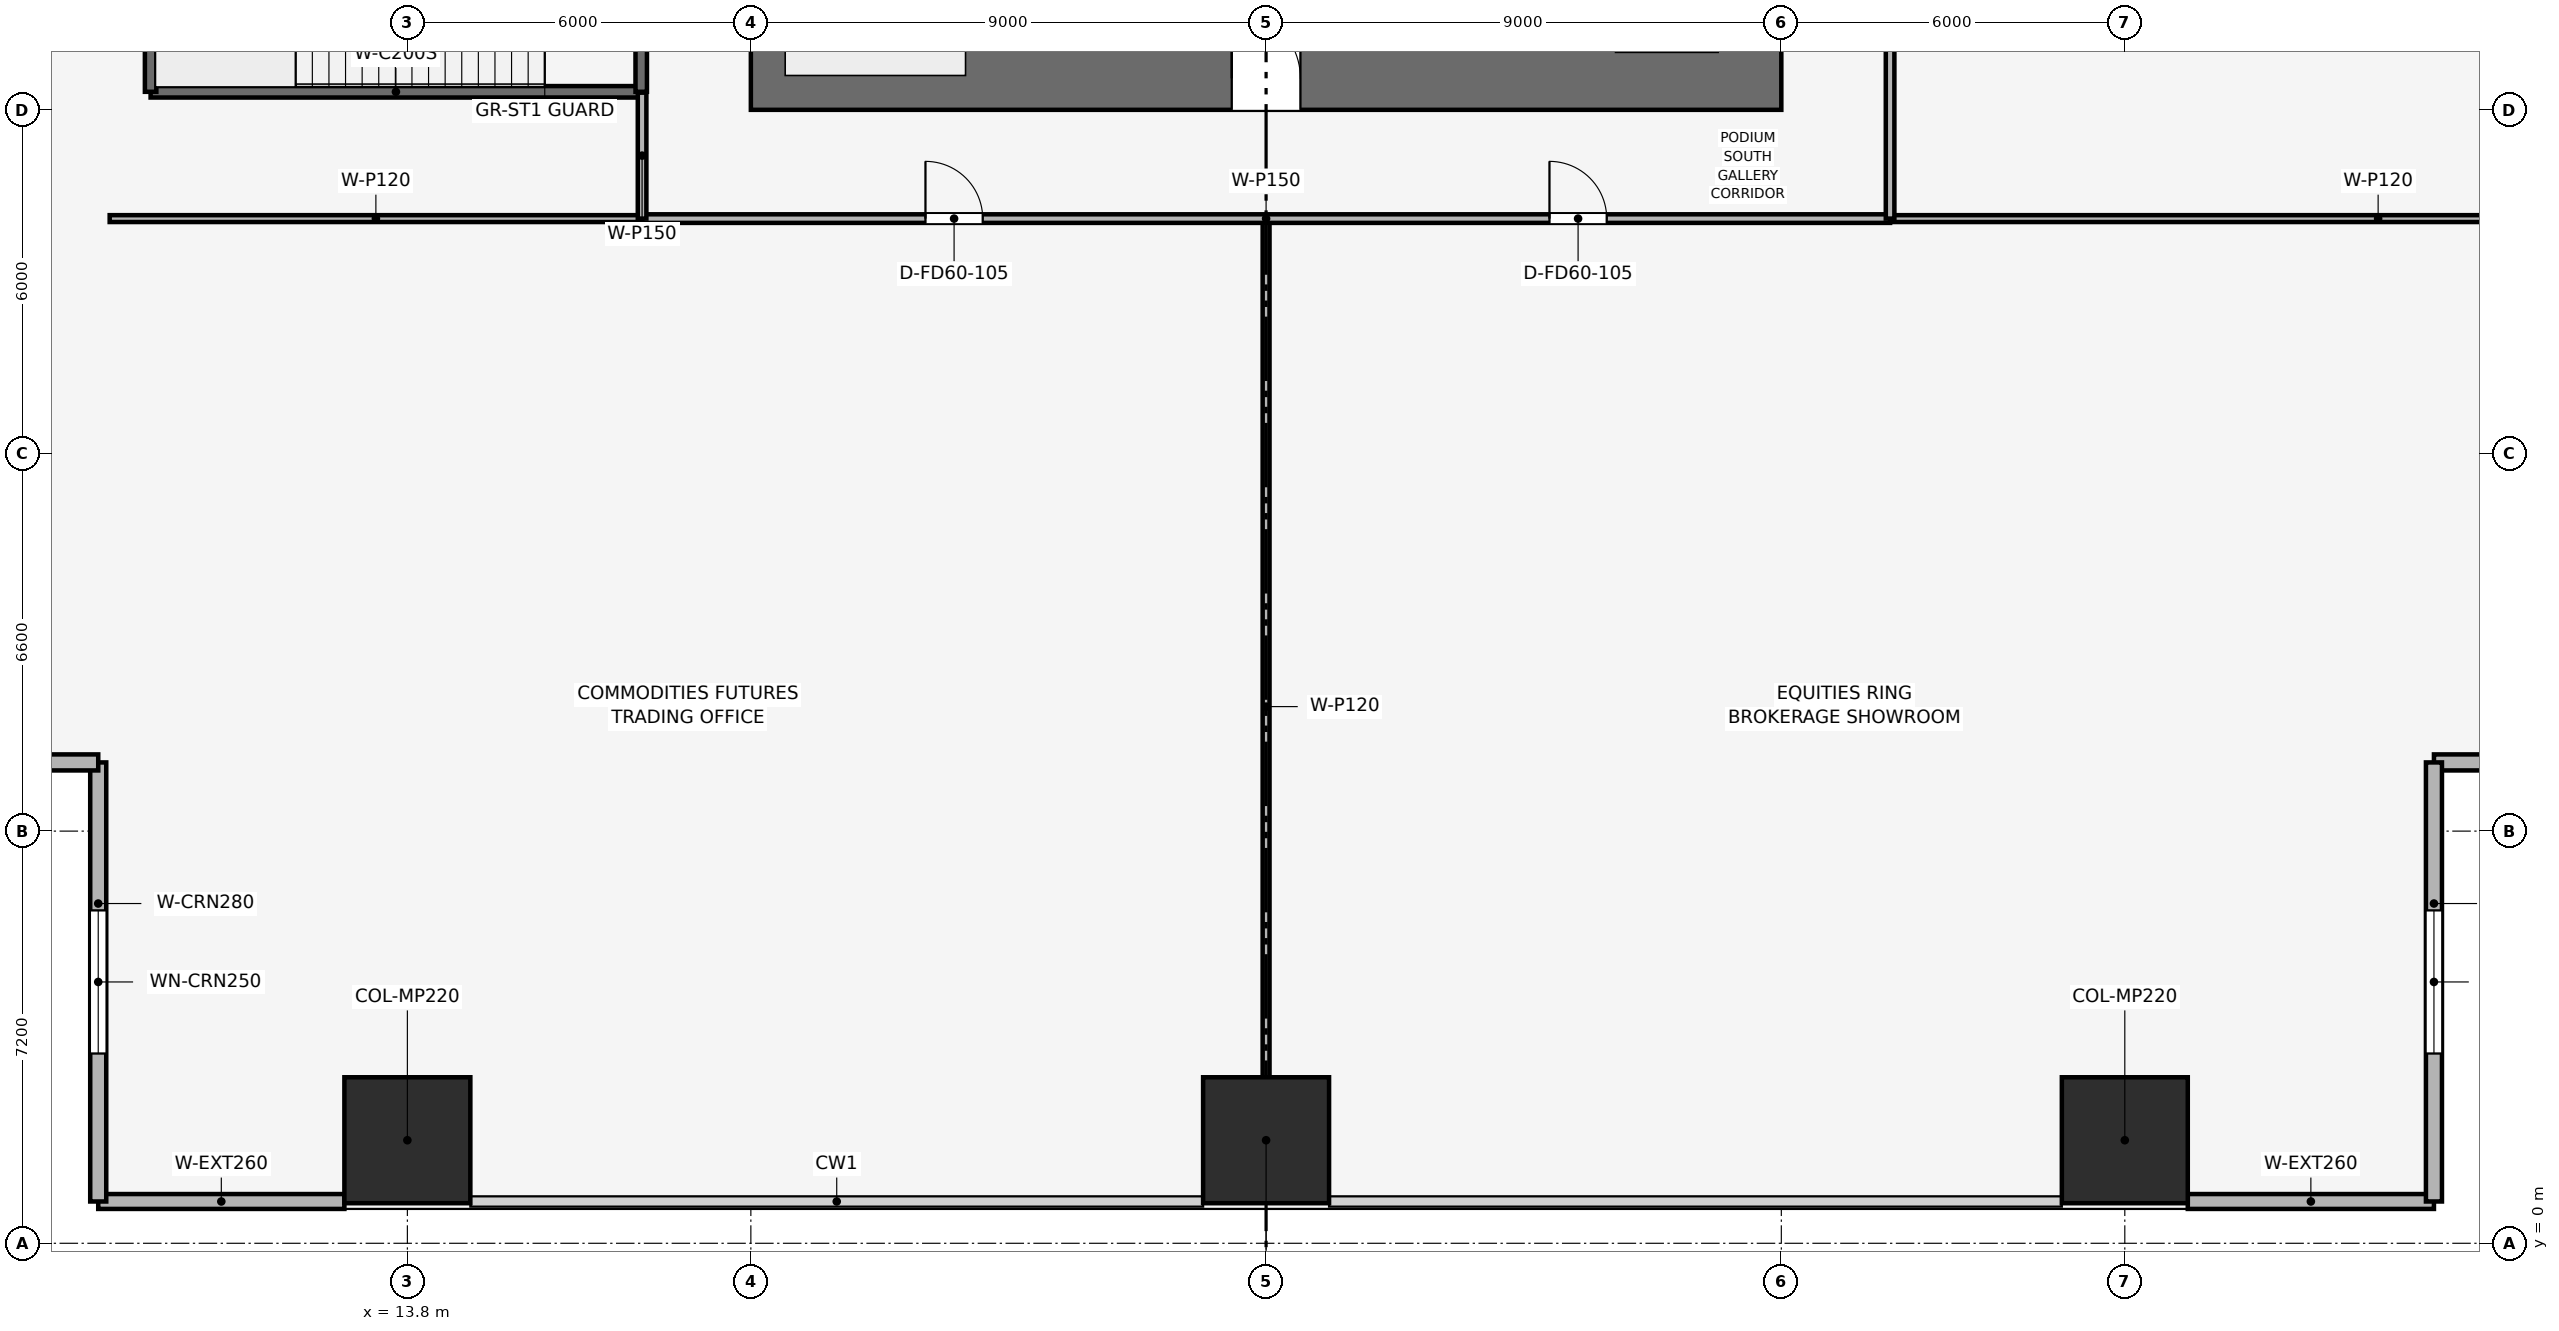
"""IFC4 building model, lengths in metres.
Left out: names, types, materials, properties, quantities, classifications, styles, units other than length and angle.
Written with IfcOpenShell. Run it as: python <this file> out.ifc"""

import sys

from ifc_helpers import new_model, si_unit, direction, frame, frame_2d, origin, origin_2d, place, context, subcontext, project, spatial, rectangle, extrude, element, fill, save


model = new_model("IFC4")
c1 = context("Model", 3, precision=1e-05, world=origin(), true_north=direction((0.0, 1.0)))
c2 = subcontext(c1, "Body", "Model", "MODEL_VIEW")
j1 = project(units=[si_unit("LENGTHUNIT", "METRE"), si_unit("PLANEANGLEUNIT", "RADIAN")], contexts=[c1])
p1 = place(None, origin())
s1 = spatial("IfcSite", under=j1, at=p1, CompositionType="ELEMENT")
p2 = place(p1, origin())
s2 = spatial("IfcBuilding", under=s1, at=p2, CompositionType="ELEMENT")
p3 = place(p2, frame((0.0, 0.0, 8.4)))
s3 = spatial("IfcBuildingStorey", under=s2, at=p3, CompositionType="ELEMENT", Elevation=8.4)
p4 = place(p3, frame((19.8, 20.35, 0.0), z_axis=(0.0, 0.0, 1.0), x_axis=(1.0, 0.0, 0.0)))
e1 = element("IfcWall", 1, at=p4, inside=s3, PredefinedType="SHEAR", context=c2, shape_type="SweptSolid", body=[
    extrude(rectangle(XDim=18.0, YDim=1.1, at=frame_2d((9.0, 0.0))), origin(), (0.0, 0.0, 1.0), 5.4),
])
p5 = place(p4, frame((8.4, 0.0, 0.0)))
e2 = element("IfcOpeningElement", 2, at=p5, cuts=e1, PredefinedType="OPENING", context=c2, shape_type="SweptSolid", body=[
    extrude(rectangle(XDim=1.2, YDim=2.2, at=frame_2d((0.6, 1.1))), frame((0.0, 0.56, 0.0), z_axis=(0.0, -1.0, 0.0), x_axis=(1.0, 0.0, 0.0)), (0.0, 0.0, 1.0), 1.12),
])
for number, where, z_axis, x_axis in (
    (3, (13.8, 1.8, 0.002), (0.0, 0.0, 1.0), (1.0, 0.0, 0.0)),
    (4, (28.8, 1.8, 0.002), (0.0, 0.0, 1.0), (1.0, 0.0, 0.0)),
    (5, (43.8, 1.8, 0.002), (0.0, 0.0, 1.0), (1.0, 0.0, 0.0)),
):
    element("IfcColumn", number, at=place(p3, frame(where, z_axis=z_axis, x_axis=x_axis)), inside=s3, PredefinedType="PILASTER", context=c2, shape_type="SweptSolid", body=[
        extrude(rectangle(XDim=2.2, YDim=2.2, at=origin_2d()), origin(), (0.0, 0.0, 1.0), 5.396),
    ])
for number, where, z_axis, x_axis in (
    (6, (12.7, 0.73, 0.0), (0.0, 0.0, 1.0), (-1.0, 0.0, 0.0)),
    (7, (49.2, 0.73, 0.0), (0.0, 0.0, 1.0), (-1.0, 0.0, 0.0)),
):
    element("IfcWall", number, at=place(p3, frame(where, z_axis=z_axis, x_axis=x_axis)), inside=s3, PredefinedType="SOLIDWALL", context=c2, shape_type="SweptSolid", body=[
        extrude(rectangle(XDim=4.3, YDim=0.26, at=frame_2d((2.15, 0.0))), origin(), (0.0, 0.0, 1.0), 5.05),
    ])
p6 = place(p3, frame((8.4, 0.73, 0.0), z_axis=(0.0, 0.0, 1.0), x_axis=(0.0, 1.0, 0.0)))
e8 = element("IfcWall", 8, at=p6, inside=s3, PredefinedType="SOLIDWALL", context=c2, shape_type="SweptSolid", body=[
    extrude(rectangle(XDim=7.67, YDim=0.28, at=frame_2d((3.835, 0.0))), origin(), (0.0, 0.0, 1.0), 5.05),
])
p7 = place(p6, frame((2.585, 0.0, 0.9)))
e9 = element("IfcOpeningElement", 9, at=p7, cuts=e8, PredefinedType="OPENING", context=c2, shape_type="SweptSolid", body=[
    extrude(rectangle(XDim=2.5, YDim=1.9, at=frame_2d((1.25, 0.95))), frame((0.0, 0.15, 0.0), z_axis=(0.0, -1.0, 0.0), x_axis=(1.0, 0.0, 0.0)), (0.0, 0.0, 1.0), 0.3),
])
p8 = place(p3, frame((8.4, 8.4, 0.0), z_axis=(0.0, 0.0, 1.0), x_axis=(-1.0, 0.0, 0.0)))
e10 = element("IfcWall", 10, at=p8, inside=s3, PredefinedType="SOLIDWALL", context=c2, shape_type="SweptSolid", body=[
    extrude(rectangle(XDim=7.67, YDim=0.28, at=frame_2d((3.835, 0.0))), origin(), (0.0, 0.0, 1.0), 5.05),
])
p9 = place(p8, frame((2.585, 0.0, 0.9)))
e11 = element("IfcOpeningElement", 11, at=p9, cuts=e10, PredefinedType="OPENING", context=c2, shape_type="SweptSolid", body=[
    extrude(rectangle(XDim=2.5, YDim=1.9, at=frame_2d((1.25, 0.95))), frame((0.0, 0.15, 0.0), z_axis=(0.0, -1.0, 0.0), x_axis=(1.0, 0.0, 0.0)), (0.0, 0.0, 1.0), 0.3),
])
p10 = place(p3, frame((56.87, 8.4, 0.0), z_axis=(0.0, 0.0, 1.0), x_axis=(-1.0, 0.0, 0.0)))
e12 = element("IfcWall", 12, at=p10, inside=s3, PredefinedType="SOLIDWALL", context=c2, shape_type="SweptSolid", body=[
    extrude(rectangle(XDim=7.67, YDim=0.28, at=frame_2d((3.835, 0.0))), origin(), (0.0, 0.0, 1.0), 5.05),
])
p11 = place(p10, frame((2.585, 0.0, 0.9)))
e13 = element("IfcOpeningElement", 13, at=p11, cuts=e12, PredefinedType="OPENING", context=c2, shape_type="SweptSolid", body=[
    extrude(rectangle(XDim=2.5, YDim=1.9, at=frame_2d((1.25, 0.95))), frame((0.0, 0.15, 0.0), z_axis=(0.0, -1.0, 0.0), x_axis=(1.0, 0.0, 0.0)), (0.0, 0.0, 1.0), 0.3),
])
p12 = place(p3, frame((49.2, 8.4, 0.0), z_axis=(0.0, 0.0, 1.0), x_axis=(0.0, -1.0, 0.0)))
e14 = element("IfcWall", 14, at=p12, inside=s3, PredefinedType="SOLIDWALL", context=c2, shape_type="SweptSolid", body=[
    extrude(rectangle(XDim=7.67, YDim=0.28, at=frame_2d((3.835, 0.0))), origin(), (0.0, 0.0, 1.0), 5.05),
])
p13 = place(p12, frame((2.585, 0.0, 0.9)))
e15 = element("IfcOpeningElement", 15, at=p13, cuts=e14, PredefinedType="OPENING", context=c2, shape_type="SweptSolid", body=[
    extrude(rectangle(XDim=2.5, YDim=1.9, at=frame_2d((1.25, 0.95))), frame((0.0, 0.15, 0.0), z_axis=(0.0, -1.0, 0.0), x_axis=(1.0, 0.0, 0.0)), (0.0, 0.0, 1.0), 0.3),
])
p14 = place(p3, frame((9.315, 20.115, 0.0), z_axis=(0.0, 0.0, 1.0), x_axis=(1.0, 0.0, 0.0)))
e16 = element("IfcWall", 16, at=p14, inside=s3, PredefinedType="SHEAR", context=c2, shape_type="SweptSolid", body=[
    extrude(rectangle(XDim=8.57, YDim=0.2, at=frame_2d((4.285, 0.0))), origin(), (0.0, 0.0, 1.0), 5.398),
])
p15 = place(p3, frame((9.315, 20.115, 0.0), z_axis=(0.0, 0.0, 1.0), x_axis=(0.0, 1.0, 0.0)))
e17 = element("IfcWall", 17, at=p15, inside=s3, PredefinedType="SHEAR", context=c2, shape_type="SweptSolid", body=[
    extrude(rectangle(XDim=3.32, YDim=0.2, at=frame_2d((1.66, 0.0))), origin(), (0.0, 0.0, 1.0), 5.398),
])
p16 = place(p3, frame((17.885, 20.115, 0.0), z_axis=(0.0, 0.0, 1.0), x_axis=(0.0, 1.0, 0.0)))
e18 = element("IfcWall", 18, at=p16, inside=s3, PredefinedType="SHEAR", context=c2, shape_type="SweptSolid", body=[
    extrude(rectangle(XDim=3.32, YDim=0.2, at=frame_2d((1.66, 0.0))), origin(), (0.0, 0.0, 1.0), 5.398),
])
p17 = place(p16, frame((0.9, 0.0, 0.0)))
e19 = element("IfcOpeningElement", 19, at=p17, cuts=e18, PredefinedType="OPENING", context=c2, shape_type="SweptSolid", body=[
    extrude(rectangle(XDim=1.1, YDim=2.15, at=frame_2d((0.55, 1.075))), frame((0.0, 0.11, 0.0), z_axis=(0.0, -1.0, 0.0), x_axis=(1.0, 0.0, 0.0)), (0.0, 0.0, 1.0), 0.22),
])
p18 = place(p3, frame((28.8, 0.85, 0.0), z_axis=(0.0, 0.0, 1.0), x_axis=(0.0, 1.0, 0.0)))
e20 = element("IfcWall", 20, at=p18, inside=s3, PredefinedType="PARTITIONING", context=c2, shape_type="SweptSolid", body=[
    extrude(rectangle(XDim=17.05, YDim=0.12, at=frame_2d((8.525, 0.0))), origin(), (0.0, 0.0, 1.0), 4.035),
])
p19 = place(p3, frame((8.6, 17.9, 0.0), z_axis=(0.0, 0.0, 1.0), x_axis=(1.0, 0.0, 0.0)))
e21 = element("IfcWall", 21, at=p19, inside=s3, PredefinedType="PARTITIONING", context=c2, shape_type="SweptSolid", body=[
    extrude(rectangle(XDim=9.3, YDim=0.12, at=frame_2d((4.65, 0.0))), origin(), (0.0, 0.0, 1.0), 5.05),
])
p20 = place(p3, frame((39.7, 17.9, 0.0), z_axis=(0.0, 0.0, 1.0), x_axis=(1.0, 0.0, 0.0)))
e22 = element("IfcWall", 22, at=p20, inside=s3, PredefinedType="PARTITIONING", context=c2, shape_type="SweptSolid", body=[
    extrude(rectangle(XDim=17.05, YDim=0.12, at=frame_2d((8.525, 0.0))), origin(), (0.0, 0.0, 1.0), 4.035),
])
p21 = place(p3, frame((17.9, 17.9, 0.0), z_axis=(0.0, 0.0, 1.0), x_axis=(1.0, 0.0, 0.0)))
e23 = element("IfcWall", 23, at=p21, inside=s3, PredefinedType="PARTITIONING", context=c2, shape_type="SweptSolid", body=[
    extrude(rectangle(XDim=21.8, YDim=0.15, at=frame_2d((10.9, 0.0))), origin(), (0.0, 0.0, 1.0), 4.135),
])
p22 = place(p21, frame((4.95, 0.0, 0.0)))
e24 = element("IfcOpeningElement", 24, at=p22, cuts=e23, PredefinedType="OPENING", context=c2, shape_type="SweptSolid", body=[
    extrude(rectangle(XDim=1.0, YDim=2.15, at=frame_2d((0.5, 1.075))), frame((0.0, 0.085, 0.0), z_axis=(0.0, -1.0, 0.0), x_axis=(1.0, 0.0, 0.0)), (0.0, 0.0, 1.0), 0.17),
])
p23 = place(p21, frame((15.85, 0.0, 0.0)))
e25 = element("IfcOpeningElement", 25, at=p23, cuts=e23, PredefinedType="OPENING", context=c2, shape_type="SweptSolid", body=[
    extrude(rectangle(XDim=1.0, YDim=2.15, at=frame_2d((0.5, 1.075))), frame((0.0, 0.085, 0.0), z_axis=(0.0, -1.0, 0.0), x_axis=(1.0, 0.0, 0.0)), (0.0, 0.0, 1.0), 0.17),
])
p24 = place(p3, frame((17.9, 17.9, 0.0), z_axis=(0.0, 0.0, 1.0), x_axis=(0.0, 1.0, 0.0)))
e26 = element("IfcWall", 26, at=p24, inside=s3, PredefinedType="PARTITIONING", context=c2, shape_type="SweptSolid", body=[
    extrude(rectangle(XDim=2.2, YDim=0.15, at=frame_2d((1.1, 0.0))), origin(), (0.0, 0.0, 1.0), 5.05),
])
p25 = place(p3, frame((39.7, 17.9, 0.0), z_axis=(0.0, 0.0, 1.0), x_axis=(0.0, 1.0, 0.0)))
e27 = element("IfcWall", 27, at=p25, inside=s3, PredefinedType="PARTITIONING", context=c2, shape_type="SweptSolid", body=[
    extrude(rectangle(XDim=16.25, YDim=0.15, at=frame_2d((8.125, 0.0))), origin(), (0.0, 0.0, 1.0), 4.135),
])
p26 = place(p25, frame((4.05, 0.0, 0.0)))
e28 = element("IfcOpeningElement", 28, at=p26, cuts=e27, PredefinedType="OPENING", context=c2, shape_type="SweptSolid", body=[
    extrude(rectangle(XDim=1.0, YDim=2.15, at=frame_2d((0.5, 1.075))), frame((0.0, 0.085, 0.0), z_axis=(0.0, -1.0, 0.0), x_axis=(1.0, 0.0, 0.0)), (0.0, 0.0, 1.0), 0.17),
])
p27 = place(p25, frame((12.175, 0.0, 0.0)))
e29 = element("IfcOpeningElement", 29, at=p27, cuts=e27, PredefinedType="OPENING", context=c2, shape_type="SweptSolid", body=[
    extrude(rectangle(XDim=1.0, YDim=2.15, at=frame_2d((0.5, 1.075))), frame((0.0, 0.085, 0.0), z_axis=(0.0, -1.0, 0.0), x_axis=(1.0, 0.0, 0.0)), (0.0, 0.0, 1.0), 0.17),
])
p28 = place(p7, origin())
e30 = element("IfcWindow", 30, at=p28, inside=s3, PartitioningType="SINGLE_PANEL", PredefinedType="WINDOW", context=c2, shape_type="SweptSolid", body=[
    extrude(rectangle(XDim=2.5, YDim=1.9, at=frame_2d((1.25, 0.95))), frame((0.0, 0.03, 0.0), z_axis=(0.0, -1.0, 0.0), x_axis=(1.0, 0.0, 0.0)), (0.0, 0.0, 1.0), 0.06),
])
fill(e9, e30)
p29 = place(p13, origin())
e31 = element("IfcWindow", 31, at=p29, inside=s3, PartitioningType="SINGLE_PANEL", PredefinedType="WINDOW", context=c2, shape_type="SweptSolid", body=[
    extrude(rectangle(XDim=2.5, YDim=1.9, at=frame_2d((1.25, 0.95))), frame((0.0, 0.03, 0.0), z_axis=(0.0, -1.0, 0.0), x_axis=(1.0, 0.0, 0.0)), (0.0, 0.0, 1.0), 0.06),
])
fill(e15, e31)
p30 = place(p22, origin())
e32 = element("IfcDoor", 32, at=p30, inside=s3, OperationType="SINGLE_SWING_LEFT", PredefinedType="DOOR", context=c2, shape_type="SweptSolid", body=[
    extrude(rectangle(XDim=1.0, YDim=2.15, at=frame_2d((0.5, 1.075))), frame((0.0, 0.025, 0.0), z_axis=(0.0, -1.0, 0.0), x_axis=(1.0, 0.0, 0.0)), (0.0, 0.0, 1.0), 0.05),
])
fill(e24, e32)
p31 = place(p23, origin())
e33 = element("IfcDoor", 33, at=p31, inside=s3, OperationType="SINGLE_SWING_LEFT", PredefinedType="DOOR", context=c2, shape_type="SweptSolid", body=[
    extrude(rectangle(XDim=1.0, YDim=2.15, at=frame_2d((0.5, 1.075))), frame((0.0, 0.025, 0.0), z_axis=(0.0, -1.0, 0.0), x_axis=(1.0, 0.0, 0.0)), (0.0, 0.0, 1.0), 0.05),
])
fill(e25, e33)
p32 = place(p5, origin())
e34 = element("IfcDoor", 34, at=p32, inside=s3, OperationType="SINGLE_SWING_LEFT", PredefinedType="DOOR", context=c2, shape_type="SweptSolid", body=[
    extrude(rectangle(XDim=1.2, YDim=2.2, at=frame_2d((0.6, 1.1))), frame((0.0, 0.025, 0.0), z_axis=(0.0, -1.0, 0.0), x_axis=(1.0, 0.0, 0.0)), (0.0, 0.0, 1.0), 0.05),
])
fill(e2, e34)
save(model, sys.argv[1])
